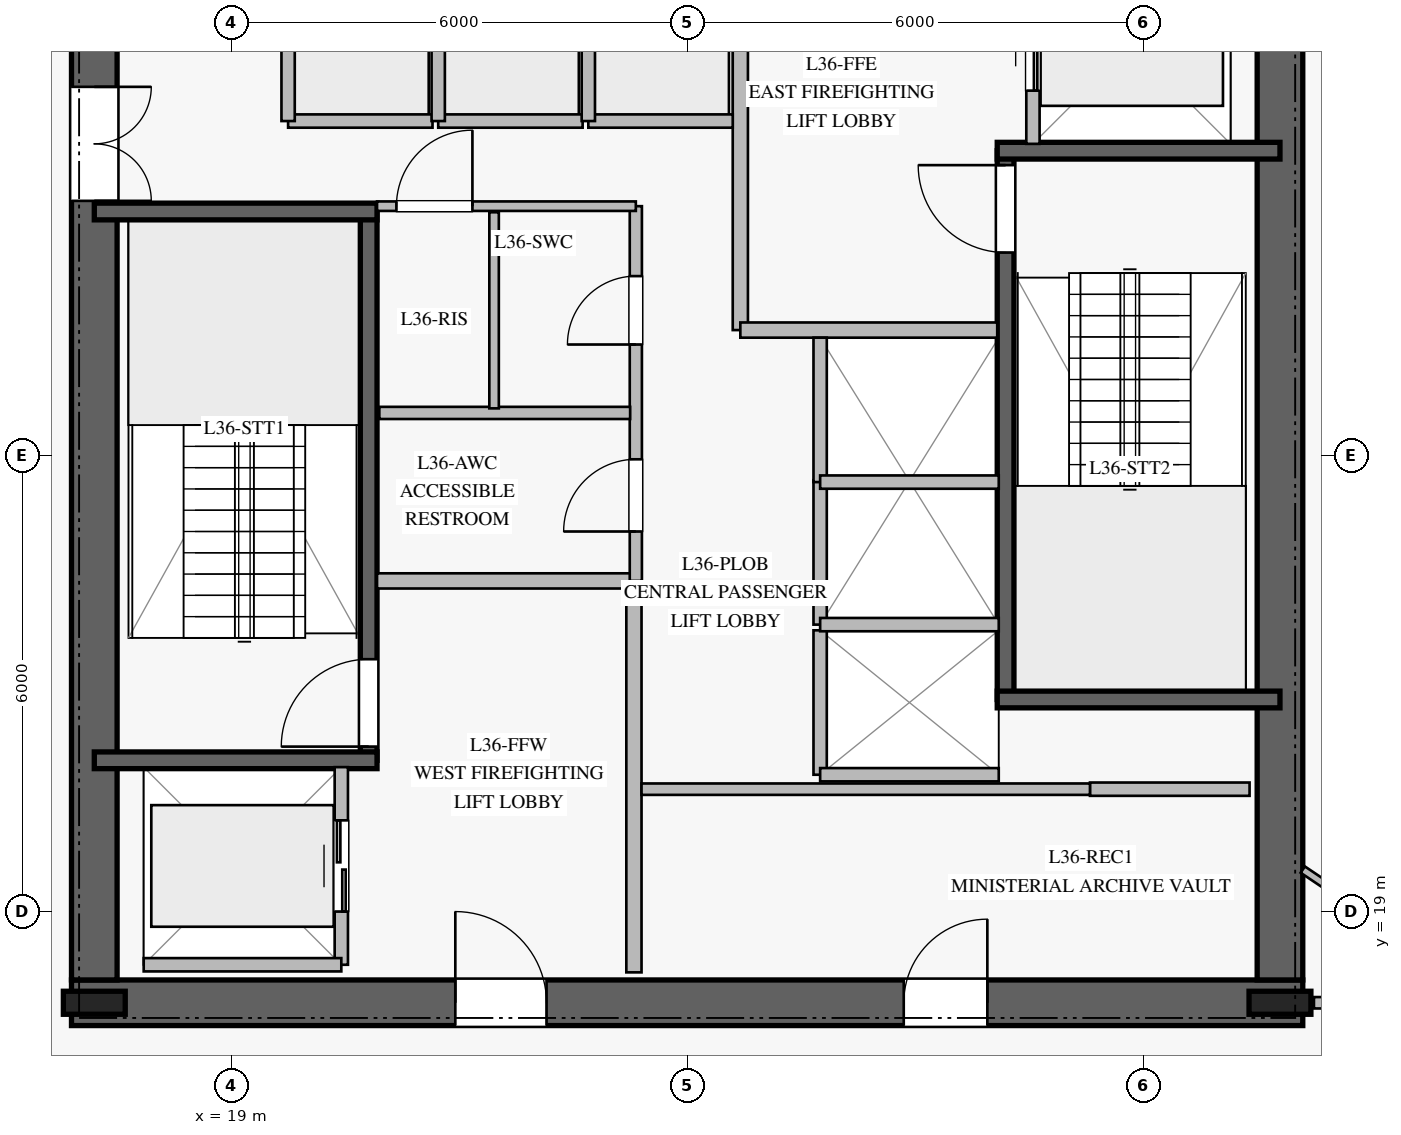
"""IFC4 building model, lengths in metres.
Left out: names, types, materials, properties, quantities, classifications, styles, units other than length and angle.
Written with IfcOpenShell. Run it as: python <this file> out.ifc"""

import sys

from ifc_helpers import new_model, si_unit, direction, frame, frame_2d, origin, origin_2d, place, context, subcontext, project, spatial, rectangle, i_section, extrude, element, fill, save


model = new_model("IFC4")
c1 = context("Model", 3, precision=1e-05, world=origin(), true_north=direction((0.0, 1.0)))
c2 = subcontext(c1, "Body", "Model", "MODEL_VIEW")
j1 = project(units=[si_unit("LENGTHUNIT", "METRE"), si_unit("PLANEANGLEUNIT", "RADIAN")], contexts=[c1])
p1 = place(None, origin())
s1 = spatial("IfcSite", under=j1, at=p1, CompositionType="ELEMENT")
p2 = place(p1, origin())
s2 = spatial("IfcBuilding", under=s1, at=p2, CompositionType="ELEMENT")
p3 = place(p2, frame((0.0, 0.0, 150.4)))
s3 = spatial("IfcBuildingStorey", under=s2, at=p3, CompositionType="ELEMENT", Elevation=150.4)
p4 = place(p3, frame((16.9, 17.8, 0.0), z_axis=(0.0, 0.0, 1.0), x_axis=(1.0, 0.0, 0.0)))
e1 = element("IfcWall", 1, at=p4, inside=s3, PredefinedType="SHEAR", context=c2, shape_type="SweptSolid", body=[
    extrude(rectangle(XDim=16.2, YDim=0.6, at=frame_2d((8.1, 0.0))), origin(), (0.0, 0.0, 1.0), 3.76),
])
p5 = place(p4, frame((5.05, 0.0, 0.0)))
e2 = element("IfcOpeningElement", 2, at=p5, cuts=e1, PredefinedType="OPENING", context=c2, shape_type="SweptSolid", body=[
    extrude(rectangle(XDim=1.2, YDim=2.25, at=frame_2d((0.6, 1.125))), frame((0.0, 0.31, 0.0), z_axis=(0.0, -1.0, 0.0), x_axis=(1.0, 0.0, 0.0)), (0.0, 0.0, 1.0), 0.62),
])
p6 = place(p4, frame((10.95, 0.0, 0.0)))
e3 = element("IfcOpeningElement", 3, at=p6, cuts=e1, PredefinedType="OPENING", context=c2, shape_type="SweptSolid", body=[
    extrude(rectangle(XDim=1.1, YDim=2.2, at=frame_2d((0.55, 1.1))), frame((0.0, 0.31, 0.0), z_axis=(0.0, -1.0, 0.0), x_axis=(1.0, 0.0, 0.0)), (0.0, 0.0, 1.0), 0.62),
])
p7 = place(p3, frame((17.2, 31.9, 0.0), z_axis=(0.0, 0.0, 1.0), x_axis=(0.0, -1.0, 0.0)))
e4 = element("IfcWall", 4, at=p7, inside=s3, PredefinedType="SHEAR", context=c2, shape_type="SweptSolid", body=[
    extrude(rectangle(XDim=13.8, YDim=0.6, at=frame_2d((6.9, 0.0))), origin(), (0.0, 0.0, 1.0), 3.76),
])
p8 = place(p7, frame((2.05, 0.0, 0.0)))
e5 = element("IfcOpeningElement", 5, at=p8, cuts=e4, PredefinedType="OPENING", context=c2, shape_type="SweptSolid", body=[
    extrude(rectangle(XDim=1.5, YDim=2.2, at=frame_2d((0.75, 1.1))), frame((0.0, 0.31, 0.0), z_axis=(0.0, -1.0, 0.0), x_axis=(1.0, 0.0, 0.0)), (0.0, 0.0, 1.0), 0.62),
])
p9 = place(p3, frame((32.8, 18.1, 0.0), z_axis=(0.0, 0.0, 1.0), x_axis=(0.0, 1.0, 0.0)))
e6 = element("IfcWall", 6, at=p9, inside=s3, PredefinedType="SHEAR", context=c2, shape_type="SweptSolid", body=[
    extrude(rectangle(XDim=13.8, YDim=0.6, at=frame_2d((6.9, 0.0))), origin(), (0.0, 0.0, 1.0), 3.76),
])
for number, where, z_axis, x_axis in (
    (7, (17.2, 17.8, 0.0), (0.0, 0.0, 1.0), (1.0, 0.0, 0.0)),
    (8, (32.8, 17.8, 0.0), (0.0, 0.0, 1.0), (1.0, 0.0, 0.0)),
):
    element("IfcColumn", number, at=place(p3, frame(where, z_axis=z_axis, x_axis=x_axis)), inside=s3, PredefinedType="COLUMN", context=c2, shape_type="SweptSolid", body=[
        extrude(i_section(OverallWidth=0.303, OverallDepth=0.814, WebThickness=0.021, FlangeThickness=0.04, at=origin_2d()), origin(), (0.0, 0.0, 1.0), 4.0),
    ])
p10 = place(p3, frame((20.81, 20.99, 0.0), z_axis=(0.0, 0.0, 1.0), x_axis=(0.0, 1.0, 0.0)))
e9 = element("IfcWall", 9, at=p10, inside=s3, PredefinedType="SOLIDWALL", context=c2, shape_type="SweptSolid", body=[
    extrude(rectangle(XDim=7.22, YDim=0.22, at=frame_2d((3.61, 0.0))), origin(), (0.0, 0.0, 1.0), 3.76),
])
p11 = place(p10, frame((0.18, 0.0, 0.0)))
e10 = element("IfcOpeningElement", 10, at=p11, cuts=e9, PredefinedType="OPENING", context=c2, shape_type="SweptSolid", body=[
    extrude(rectangle(XDim=1.15, YDim=2.2, at=frame_2d((0.575, 1.1))), frame((0.0, 0.12, 0.0), z_axis=(0.0, -1.0, 0.0), x_axis=(1.0, 0.0, 0.0)), (0.0, 0.0, 1.0), 0.24),
])
for number, where, z_axis, x_axis in (
    (11, (17.2, 20.99, 0.0), (0.0, 0.0, 1.0), (1.0, 0.0, 0.0)),
    (12, (17.2, 28.21, 0.0), (0.0, 0.0, 1.0), (1.0, 0.0, 0.0)),
):
    element("IfcWall", number, at=place(p3, frame(where, z_axis=z_axis, x_axis=x_axis)), inside=s3, PredefinedType="SOLIDWALL", context=c2, shape_type="SweptSolid", body=[
        extrude(rectangle(XDim=3.72, YDim=0.22, at=frame_2d((1.86, 0.0))), origin(), (0.0, 0.0, 1.0), 3.76),
    ])
p12 = place(p3, frame((29.19, 21.79, 0.0), z_axis=(0.0, 0.0, 1.0), x_axis=(0.0, 1.0, 0.0)))
e13 = element("IfcWall", 13, at=p12, inside=s3, PredefinedType="SOLIDWALL", context=c2, shape_type="SweptSolid", body=[
    extrude(rectangle(XDim=7.22, YDim=0.22, at=frame_2d((3.61, 0.0))), origin(), (0.0, 0.0, 1.0), 3.76),
])
p13 = place(p12, frame((5.88, 0.0, 0.0)))
e14 = element("IfcOpeningElement", 14, at=p13, cuts=e13, PredefinedType="OPENING", context=c2, shape_type="SweptSolid", body=[
    extrude(rectangle(XDim=1.15, YDim=2.2, at=frame_2d((0.575, 1.1))), frame((0.0, 0.12, 0.0), z_axis=(0.0, -1.0, 0.0), x_axis=(1.0, 0.0, 0.0)), (0.0, 0.0, 1.0), 0.24),
])
for number, where, z_axis, x_axis in (
    (15, (29.08, 21.79, 0.0), (0.0, 0.0, 1.0), (1.0, 0.0, 0.0)),
    (16, (29.08, 29.01, 0.0), (0.0, 0.0, 1.0), (1.0, 0.0, 0.0)),
):
    element("IfcWall", number, at=place(p3, frame(where, z_axis=z_axis, x_axis=x_axis)), inside=s3, PredefinedType="SOLIDWALL", context=c2, shape_type="SweptSolid", body=[
        extrude(rectangle(XDim=3.72, YDim=0.22, at=frame_2d((1.86, 0.0))), origin(), (0.0, 0.0, 1.0), 3.76),
    ])
p14 = place(p3, frame((24.3, 18.2, 0.0), z_axis=(0.0, 0.0, 1.0), x_axis=(0.0, 1.0, 0.0)))
e17 = element("IfcWall", 17, at=p14, inside=s3, PredefinedType="PARTITIONING", context=c2, shape_type="SweptSolid", body=[
    extrude(rectangle(XDim=5.15, YDim=0.2, at=frame_2d((2.575, 0.0))), origin(), (0.0, 0.0, 1.0), 3.76),
])
p15 = place(p3, frame((20.92, 23.35, 0.0), z_axis=(0.0, 0.0, 1.0), x_axis=(1.0, 0.0, 0.0)))
e18 = element("IfcWall", 18, at=p15, inside=s3, PredefinedType="PARTITIONING", context=c2, shape_type="SweptSolid", body=[
    extrude(rectangle(XDim=3.38, YDim=0.2, at=frame_2d((1.69, 0.0))), origin(), (0.0, 0.0, 1.0), 3.76),
])
p16 = place(p3, frame((25.7, 26.65, 0.0), z_axis=(0.0, 0.0, 1.0), x_axis=(0.0, 1.0, 0.0)))
e19 = element("IfcWall", 19, at=p16, inside=s3, PredefinedType="PARTITIONING", context=c2, shape_type="SweptSolid", body=[
    extrude(rectangle(XDim=5.15, YDim=0.2, at=frame_2d((2.575, 0.0))), origin(), (0.0, 0.0, 1.0), 3.76),
])
p17 = place(p3, frame((25.7, 26.65, 0.0), z_axis=(0.0, 0.0, 1.0), x_axis=(1.0, 0.0, 0.0)))
e20 = element("IfcWall", 20, at=p17, inside=s3, PredefinedType="PARTITIONING", context=c2, shape_type="SweptSolid", body=[
    extrude(rectangle(XDim=3.38, YDim=0.2, at=frame_2d((1.69, 0.0))), origin(), (0.0, 0.0, 1.0), 3.76),
])
p18 = place(p3, frame((24.325, 23.35, 0.0), z_axis=(0.0, 0.0, 1.0), x_axis=(0.0, 1.0, 0.0)))
e21 = element("IfcWall", 21, at=p18, inside=s3, PredefinedType="PLUMBINGWALL", context=c2, shape_type="SweptSolid", body=[
    extrude(rectangle(XDim=4.93, YDim=0.16, at=frame_2d((2.465, 0.0))), origin(), (0.0, 0.0, 1.0), 3.76),
])
p19 = place(p18, frame((0.65, 0.0, 0.0)))
e22 = element("IfcOpeningElement", 22, at=p19, cuts=e21, PredefinedType="OPENING", context=c2, shape_type="SweptSolid", body=[
    extrude(rectangle(XDim=0.95, YDim=2.1, at=frame_2d((0.475, 1.05))), frame((0.0, 0.09, 0.0), z_axis=(0.0, -1.0, 0.0), x_axis=(1.0, 0.0, 0.0)), (0.0, 0.0, 1.0), 0.18),
])
p20 = place(p18, frame((3.11, 0.0, 0.0)))
e23 = element("IfcOpeningElement", 23, at=p20, cuts=e21, PredefinedType="OPENING", context=c2, shape_type="SweptSolid", body=[
    extrude(rectangle(XDim=0.9, YDim=2.1, at=frame_2d((0.45, 1.05))), frame((0.0, 0.09, 0.0), z_axis=(0.0, -1.0, 0.0), x_axis=(1.0, 0.0, 0.0)), (0.0, 0.0, 1.0), 0.18),
])
p21 = place(p3, frame((20.92, 28.28, 0.0), z_axis=(0.0, 0.0, 1.0), x_axis=(1.0, 0.0, 0.0)))
e24 = element("IfcWall", 24, at=p21, inside=s3, PredefinedType="PARTITIONING", context=c2, shape_type="SweptSolid", body=[
    extrude(rectangle(XDim=3.405, YDim=0.125, at=frame_2d((1.703, 0.0))), origin(), (0.0, 0.0, 1.0), 3.76),
])
p22 = place(p21, frame((0.255, 0.0, 0.0)))
e25 = element("IfcOpeningElement", 25, at=p22, cuts=e24, PredefinedType="OPENING", context=c2, shape_type="SweptSolid", body=[
    extrude(rectangle(XDim=1.0, YDim=2.15, at=frame_2d((0.5, 1.075))), frame((0.0, 0.073, 0.0), z_axis=(0.0, -1.0, 0.0), x_axis=(1.0, 0.0, 0.0)), (0.0, 0.0, 1.0), 0.145),
])
p23 = place(p3, frame((20.95, 25.56, 0.0), z_axis=(0.0, 0.0, 1.0), x_axis=(1.0, 0.0, 0.0)))
e26 = element("IfcWall", 26, at=p23, inside=s3, PredefinedType="PLUMBINGWALL", context=c2, shape_type="SweptSolid", body=[
    extrude(rectangle(XDim=3.3, YDim=0.16, at=frame_2d((1.65, 0.0))), origin(), (0.0, 0.0, 1.0), 3.76),
])
p24 = place(p3, frame((22.46, 25.62, 0.0), z_axis=(0.0, 0.0, 1.0), x_axis=(0.0, 1.0, 0.0)))
e27 = element("IfcWall", 27, at=p24, inside=s3, PredefinedType="PARTITIONING", context=c2, shape_type="SweptSolid", body=[
    extrude(rectangle(XDim=2.58, YDim=0.125, at=frame_2d((1.29, 0.0))), origin(), (0.0, 0.0, 1.0), 3.76),
])
p25 = place(p3, frame((30.3, 20.61, 0.0), z_axis=(0.0, 0.0, 1.0), x_axis=(1.0, 0.0, 0.0)))
e28 = element("IfcWall", 28, at=p25, inside=s3, PredefinedType="PARTITIONING", context=c2, shape_type="SweptSolid", body=[
    extrude(rectangle(XDim=2.1, YDim=0.175, at=frame_2d((1.05, 0.0))), origin(), (0.0, 0.0, 1.0), 3.76),
])
p26 = place(p3, frame((24.4, 20.61, 0.0), z_axis=(0.0, 0.0, 1.0), x_axis=(1.0, 0.0, 0.0)))
e29 = element("IfcWall", 29, at=p26, inside=s3, PredefinedType="PARTITIONING", context=c2, shape_type="SweptSolid", body=[
    extrude(rectangle(XDim=5.9, YDim=0.15, at=frame_2d((2.95, 0.0))), origin(), (0.0, 0.0, 1.0), 3.76),
])
p27 = place(p3, frame((19.75, 29.4, 0.0), z_axis=(0.0, 0.0, 1.0), x_axis=(1.0, 0.0, 0.0)))
e30 = element("IfcWall", 30, at=p27, inside=s3, PredefinedType="PARTITIONING", context=c2, shape_type="SweptSolid", body=[
    extrude(rectangle(XDim=1.9, YDim=0.175, at=frame_2d((0.95, 0.0))), origin(), (0.0, 0.0, 1.0), 3.76),
])
p28 = place(p3, frame((19.75, 29.4, 0.0), z_axis=(0.0, 0.0, 1.0), x_axis=(0.0, 1.0, 0.0)))
e31 = element("IfcWall", 31, at=p28, inside=s3, PredefinedType="PARTITIONING", context=c2, shape_type="SweptSolid", body=[
    extrude(rectangle(XDim=2.35, YDim=0.175, at=frame_2d((1.175, 0.0))), origin(), (0.0, 0.0, 1.0), 3.76),
])
p29 = place(p3, frame((21.725, 29.4, 0.0), z_axis=(0.0, 0.0, 1.0), x_axis=(1.0, 0.0, 0.0)))
e32 = element("IfcWall", 32, at=p29, inside=s3, PredefinedType="PARTITIONING", context=c2, shape_type="SweptSolid", body=[
    extrude(rectangle(XDim=1.9, YDim=0.175, at=frame_2d((0.95, 0.0))), origin(), (0.0, 0.0, 1.0), 3.76),
])
p30 = place(p3, frame((21.725, 29.4, 0.0), z_axis=(0.0, 0.0, 1.0), x_axis=(0.0, 1.0, 0.0)))
e33 = element("IfcWall", 33, at=p30, inside=s3, PredefinedType="PARTITIONING", context=c2, shape_type="SweptSolid", body=[
    extrude(rectangle(XDim=2.35, YDim=0.175, at=frame_2d((1.175, 0.0))), origin(), (0.0, 0.0, 1.0), 3.76),
])
p31 = place(p3, frame((23.7, 29.4, 0.0), z_axis=(0.0, 0.0, 1.0), x_axis=(1.0, 0.0, 0.0)))
e34 = element("IfcWall", 34, at=p31, inside=s3, PredefinedType="PARTITIONING", context=c2, shape_type="SweptSolid", body=[
    extrude(rectangle(XDim=1.9, YDim=0.175, at=frame_2d((0.95, 0.0))), origin(), (0.0, 0.0, 1.0), 3.76),
])
p32 = place(p3, frame((23.7, 29.4, 0.0), z_axis=(0.0, 0.0, 1.0), x_axis=(0.0, 1.0, 0.0)))
e35 = element("IfcWall", 35, at=p32, inside=s3, PredefinedType="PARTITIONING", context=c2, shape_type="SweptSolid", body=[
    extrude(rectangle(XDim=2.35, YDim=0.175, at=frame_2d((1.175, 0.0))), origin(), (0.0, 0.0, 1.0), 3.76),
])
p33 = place(p3, frame((26.75, 20.8, 0.0), z_axis=(0.0, 0.0, 1.0), x_axis=(0.0, 1.0, 0.0)))
e36 = element("IfcWall", 36, at=p33, inside=s3, PredefinedType="PARTITIONING", context=c2, shape_type="SweptSolid", body=[
    extrude(rectangle(XDim=1.9, YDim=0.175, at=frame_2d((0.95, 0.0))), origin(), (0.0, 0.0, 1.0), 3.76),
])
p34 = place(p3, frame((26.75, 20.8, 0.0), z_axis=(0.0, 0.0, 1.0), x_axis=(1.0, 0.0, 0.0)))
e37 = element("IfcWall", 37, at=p34, inside=s3, PredefinedType="PARTITIONING", context=c2, shape_type="SweptSolid", body=[
    extrude(rectangle(XDim=2.35, YDim=0.175, at=frame_2d((1.175, 0.0))), origin(), (0.0, 0.0, 1.0), 3.76),
])
p35 = place(p3, frame((26.75, 22.775, 0.0), z_axis=(0.0, 0.0, 1.0), x_axis=(0.0, 1.0, 0.0)))
e38 = element("IfcWall", 38, at=p35, inside=s3, PredefinedType="PARTITIONING", context=c2, shape_type="SweptSolid", body=[
    extrude(rectangle(XDim=1.9, YDim=0.175, at=frame_2d((0.95, 0.0))), origin(), (0.0, 0.0, 1.0), 3.76),
])
p36 = place(p3, frame((26.75, 22.775, 0.0), z_axis=(0.0, 0.0, 1.0), x_axis=(1.0, 0.0, 0.0)))
e39 = element("IfcWall", 39, at=p36, inside=s3, PredefinedType="PARTITIONING", context=c2, shape_type="SweptSolid", body=[
    extrude(rectangle(XDim=2.35, YDim=0.175, at=frame_2d((1.175, 0.0))), origin(), (0.0, 0.0, 1.0), 3.76),
])
p37 = place(p3, frame((26.75, 24.65, 0.0), z_axis=(0.0, 0.0, 1.0), x_axis=(0.0, 1.0, 0.0)))
e40 = element("IfcWall", 40, at=p37, inside=s3, PredefinedType="PARTITIONING", context=c2, shape_type="SweptSolid", body=[
    extrude(rectangle(XDim=1.9, YDim=0.175, at=frame_2d((0.95, 0.0))), origin(), (0.0, 0.0, 1.0), 3.76),
])
p38 = place(p3, frame((26.75, 24.65, 0.0), z_axis=(0.0, 0.0, 1.0), x_axis=(1.0, 0.0, 0.0)))
e41 = element("IfcWall", 41, at=p38, inside=s3, PredefinedType="PARTITIONING", context=c2, shape_type="SweptSolid", body=[
    extrude(rectangle(XDim=2.35, YDim=0.175, at=frame_2d((1.175, 0.0))), origin(), (0.0, 0.0, 1.0), 3.76),
])
p39 = place(p3, frame((20.45, 18.3, 0.0), z_axis=(0.0, 0.0, 1.0), x_axis=(0.0, 1.0, 0.0)))
e42 = element("IfcWall", 42, at=p39, inside=s3, PredefinedType="PARTITIONING", context=c2, shape_type="SweptSolid", body=[
    extrude(rectangle(XDim=2.6, YDim=0.175, at=frame_2d((1.3, 0.0))), origin(), (0.0, 0.0, 1.0), 3.76),
])
p40 = place(p39, frame((0.7, 0.0, 0.0)))
e43 = element("IfcOpeningElement", 43, at=p40, cuts=e42, PredefinedType="OPENING", context=c2, shape_type="SweptSolid", body=[
    extrude(rectangle(XDim=1.2, YDim=2.2, at=frame_2d((0.6, 1.1))), frame((0.0, 0.098, 0.0), z_axis=(0.0, -1.0, 0.0), x_axis=(1.0, 0.0, 0.0)), (0.0, 0.0, 1.0), 0.195),
])
p41 = place(p3, frame((17.85, 18.3, 0.0), z_axis=(0.0, 0.0, 1.0), x_axis=(1.0, 0.0, 0.0)))
e44 = element("IfcWall", 44, at=p41, inside=s3, PredefinedType="PARTITIONING", context=c2, shape_type="SweptSolid", body=[
    extrude(rectangle(XDim=2.6, YDim=0.175, at=frame_2d((1.3, 0.0))), origin(), (0.0, 0.0, 1.0), 3.76),
])
p42 = place(p3, frame((29.55, 29.1, 0.0), z_axis=(0.0, 0.0, 1.0), x_axis=(0.0, 1.0, 0.0)))
e45 = element("IfcWall", 45, at=p42, inside=s3, PredefinedType="PARTITIONING", context=c2, shape_type="SweptSolid", body=[
    extrude(rectangle(XDim=2.6, YDim=0.175, at=frame_2d((1.3, 0.0))), origin(), (0.0, 0.0, 1.0), 3.76),
])
p43 = place(p42, frame((0.7, 0.0, 0.0)))
e46 = element("IfcOpeningElement", 46, at=p43, cuts=e45, PredefinedType="OPENING", context=c2, shape_type="SweptSolid", body=[
    extrude(rectangle(XDim=1.2, YDim=2.2, at=frame_2d((0.6, 1.1))), frame((0.0, 0.098, 0.0), z_axis=(0.0, -1.0, 0.0), x_axis=(1.0, 0.0, 0.0)), (0.0, 0.0, 1.0), 0.195),
])
p44 = place(p3, frame((33.247, 17.8, 0.0), z_axis=(0.0, 0.0, 1.0), x_axis=(1.0, 0.0, 0.0)))
e47 = element("IfcWall", 47, at=p44, inside=s3, PredefinedType="PARTITIONING", context=c2, shape_type="SweptSolid", body=[
    extrude(rectangle(XDim=7.953, YDim=0.15, at=frame_2d((3.977, 0.0))), origin(), (0.0, 0.0, 1.0), 3.05),
])
p45 = place(p3, frame((33.1, 19.552, 0.0), z_axis=(0.0, 0.0, 1.0), x_axis=(0.829697218319, -0.55821369198, 0.0)))
e48 = element("IfcWall", 48, at=p45, inside=s3, PredefinedType="MOVABLE", context=c2, shape_type="SweptSolid", body=[
    extrude(rectangle(XDim=3.138, YDim=0.1, at=frame_2d((1.569, 0.0))), origin(), (0.0, 0.0, 1.0), 3.21),
])
p46 = place(p11, origin())
e49 = element("IfcDoor", 49, at=p46, inside=s3, OperationType="SINGLE_SWING_LEFT", PredefinedType="DOOR", context=c2, shape_type="SweptSolid", body=[
    extrude(rectangle(XDim=1.15, YDim=2.2, at=frame_2d((0.575, 1.1))), frame((0.0, 0.025, 0.0), z_axis=(0.0, -1.0, 0.0), x_axis=(1.0, 0.0, 0.0)), (0.0, 0.0, 1.0), 0.05),
])
fill(e10, e49)
p47 = place(p13, origin())
e50 = element("IfcDoor", 50, at=p47, inside=s3, OperationType="SINGLE_SWING_RIGHT", PredefinedType="DOOR", context=c2, shape_type="SweptSolid", body=[
    extrude(rectangle(XDim=1.15, YDim=2.2, at=frame_2d((0.575, 1.1))), frame((0.0, 0.025, 0.0), z_axis=(0.0, -1.0, 0.0), x_axis=(1.0, 0.0, 0.0)), (0.0, 0.0, 1.0), 0.05),
])
fill(e14, e50)
p48 = place(p5, origin())
e51 = element("IfcDoor", 51, at=p48, inside=s3, OperationType="SINGLE_SWING_LEFT", PredefinedType="DOOR", context=c2, shape_type="SweptSolid", body=[
    extrude(rectangle(XDim=1.2, YDim=2.25, at=frame_2d((0.6, 1.125))), frame((0.0, 0.025, 0.0), z_axis=(0.0, -1.0, 0.0), x_axis=(1.0, 0.0, 0.0)), (0.0, 0.0, 1.0), 0.05),
])
fill(e2, e51)
p49 = place(p8, origin())
e52 = element("IfcDoor", 52, at=p49, inside=s3, OperationType="DOUBLE_DOOR_SINGLE_SWING", PredefinedType="DOOR", context=c2, shape_type="SweptSolid", body=[
    extrude(rectangle(XDim=1.5, YDim=2.2, at=frame_2d((0.75, 1.1))), frame((0.0, 0.025, 0.0), z_axis=(0.0, -1.0, 0.0), x_axis=(1.0, 0.0, 0.0)), (0.0, 0.0, 1.0), 0.05),
])
fill(e5, e52)
p50 = place(p19, origin())
e53 = element("IfcDoor", 53, at=p50, inside=s3, OperationType="SINGLE_SWING_LEFT", PredefinedType="DOOR", context=c2, shape_type="SweptSolid", body=[
    extrude(rectangle(XDim=0.95, YDim=2.1, at=frame_2d((0.475, 1.05))), frame((0.0, 0.025, 0.0), z_axis=(0.0, -1.0, 0.0), x_axis=(1.0, 0.0, 0.0)), (0.0, 0.0, 1.0), 0.05),
])
fill(e22, e53)
p51 = place(p22, origin())
e54 = element("IfcDoor", 54, at=p51, inside=s3, OperationType="SINGLE_SWING_RIGHT", PredefinedType="DOOR", context=c2, shape_type="SweptSolid", body=[
    extrude(rectangle(XDim=1.0, YDim=2.15, at=frame_2d((0.5, 1.075))), frame((0.0, 0.025, 0.0), z_axis=(0.0, -1.0, 0.0), x_axis=(1.0, 0.0, 0.0)), (0.0, 0.0, 1.0), 0.05),
])
fill(e25, e54)
p52 = place(p20, origin())
e55 = element("IfcDoor", 55, at=p52, inside=s3, OperationType="SINGLE_SWING_LEFT", PredefinedType="DOOR", context=c2, shape_type="SweptSolid", body=[
    extrude(rectangle(XDim=0.9, YDim=2.1, at=frame_2d((0.45, 1.05))), frame((0.0, 0.025, 0.0), z_axis=(0.0, -1.0, 0.0), x_axis=(1.0, 0.0, 0.0)), (0.0, 0.0, 1.0), 0.05),
])
fill(e23, e55)
p53 = place(p6, origin())
e56 = element("IfcDoor", 56, at=p53, inside=s3, OperationType="SINGLE_SWING_RIGHT", PredefinedType="DOOR", context=c2, shape_type="SweptSolid", body=[
    extrude(rectangle(XDim=1.1, YDim=2.2, at=frame_2d((0.55, 1.1))), frame((0.0, 0.025, 0.0), z_axis=(0.0, -1.0, 0.0), x_axis=(1.0, 0.0, 0.0)), (0.0, 0.0, 1.0), 0.05),
])
fill(e3, e56)
p54 = place(p40, origin())
e57 = element("IfcDoor", 57, at=p54, inside=s3, OperationType="DOUBLE_DOOR_SLIDING", PredefinedType="DOOR", context=c2, shape_type="SweptSolid", body=[
    extrude(rectangle(XDim=1.2, YDim=2.2, at=frame_2d((0.6, 1.1))), frame((0.0, 0.025, 0.0), z_axis=(0.0, -1.0, 0.0), x_axis=(1.0, 0.0, 0.0)), (0.0, 0.0, 1.0), 0.05),
])
fill(e43, e57)
p55 = place(p43, origin())
e58 = element("IfcDoor", 58, at=p55, inside=s3, OperationType="DOUBLE_DOOR_SLIDING", PredefinedType="DOOR", context=c2, shape_type="SweptSolid", body=[
    extrude(rectangle(XDim=1.2, YDim=2.2, at=frame_2d((0.6, 1.1))), frame((0.0, 0.025, 0.0), z_axis=(0.0, -1.0, 0.0), x_axis=(1.0, 0.0, 0.0)), (0.0, 0.0, 1.0), 0.05),
])
fill(e46, e58)
save(model, sys.argv[1])
